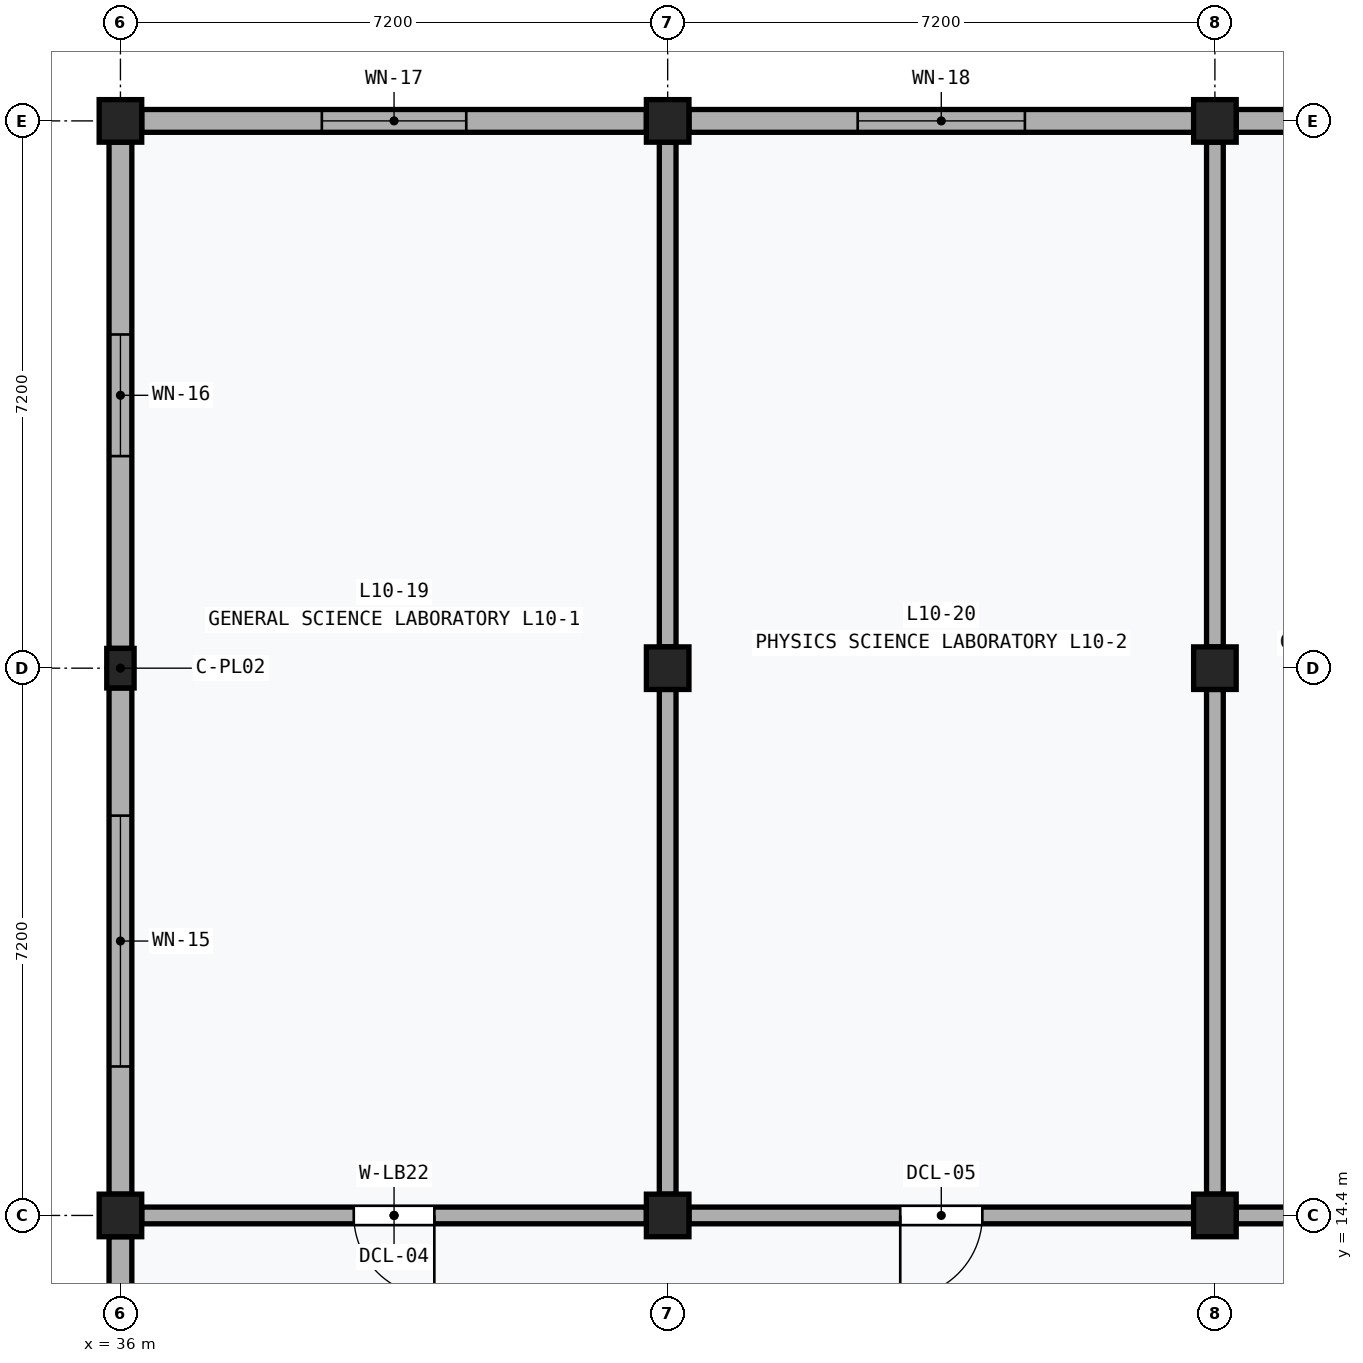
"""IFC4 building model, lengths in metres.
Left out: names, types, materials, properties, quantities, classifications, styles, units other than length and angle.
Written with IfcOpenShell. Run it as: python <this file> out.ifc"""

import sys

from ifc_helpers import new_model, si_unit, direction, frame, frame_2d, origin, origin_2d, place, context, subcontext, project, spatial, rectangle, extrude, element, fill, save


model = new_model("IFC4")
c1 = context("Model", 3, precision=1e-05, world=origin(), true_north=direction((0.0, 1.0)))
c2 = subcontext(c1, "Body", "Model", "MODEL_VIEW")
j1 = project(units=[si_unit("LENGTHUNIT", "METRE"), si_unit("PLANEANGLEUNIT", "RADIAN")], contexts=[c1])
p1 = place(None, origin())
s1 = spatial("IfcSite", under=j1, at=p1, CompositionType="ELEMENT")
p2 = place(p1, origin())
s2 = spatial("IfcBuilding", under=s1, at=p2, CompositionType="ELEMENT")
p3 = place(p2, frame((0.0, 0.0, 42.8)))
s3 = spatial("IfcBuildingStorey", under=s2, at=p3, CompositionType="ELEMENT", Elevation=42.8)
p4 = place(p3, frame((36.0, 14.4, 0.0), z_axis=(0.0, 0.0, 1.0), x_axis=(1.0, 0.0, 0.0)))
e1 = element("IfcColumn", 1, at=p4, inside=s3, PredefinedType="COLUMN", context=c2, shape_type="SweptSolid", body=[
    extrude(rectangle(XDim=0.56, YDim=0.56, at=origin_2d()), origin(), (0.0, 0.0, 1.0), 4.0),
])
p5 = place(p3, frame((36.0, 21.6, 0.0), z_axis=(0.0, 0.0, 1.0), x_axis=(1.0, 0.0, 0.0)))
e2 = element("IfcColumn", 2, at=p5, inside=s3, PredefinedType="PILASTER", context=c2, shape_type="SweptSolid", body=[
    extrude(rectangle(XDim=0.36, YDim=0.52, at=origin_2d()), origin(), (0.0, 0.0, 1.0), 4.0),
])
for number, where, z_axis, x_axis in (
    (3, (36.0, 28.8, 0.0), (0.0, 0.0, 1.0), (1.0, 0.0, 0.0)),
    (4, (43.2, 14.4, 0.0), (0.0, 0.0, 1.0), (1.0, 0.0, 0.0)),
    (5, (43.2, 21.6, 0.0), (0.0, 0.0, 1.0), (1.0, 0.0, 0.0)),
    (6, (43.2, 28.8, 0.0), (0.0, 0.0, 1.0), (1.0, 0.0, 0.0)),
    (7, (50.4, 14.4, 0.0), (0.0, 0.0, 1.0), (1.0, 0.0, 0.0)),
    (8, (50.4, 21.6, 0.0), (0.0, 0.0, 1.0), (1.0, 0.0, 0.0)),
    (9, (50.4, 28.8, 0.0), (0.0, 0.0, 1.0), (1.0, 0.0, 0.0)),
):
    element("IfcColumn", number, at=place(p3, frame(where, z_axis=z_axis, x_axis=x_axis)), inside=s3, PredefinedType="COLUMN", context=c2, shape_type="SweptSolid", body=[
        extrude(rectangle(XDim=0.56, YDim=0.56, at=origin_2d()), origin(), (0.0, 0.0, 1.0), 4.0),
    ])
p6 = place(p3, frame((36.0, 7.48, 0.0), z_axis=(0.0, 0.0, 1.0), x_axis=(0.0, 1.0, 0.0)))
e10 = element("IfcWall", 10, at=p6, inside=s3, PredefinedType="SOLIDWALL", context=c2, shape_type="SweptSolid", body=[
    extrude(rectangle(XDim=6.64, YDim=0.3, at=frame_2d((3.32, 0.0))), origin(), (0.0, 0.0, 1.0), 3.18),
])
p7 = place(p6, frame((1.82, 0.0, 0.85)))
e11 = element("IfcOpeningElement", 11, at=p7, cuts=e10, PredefinedType="OPENING", context=c2, shape_type="SweptSolid", body=[
    extrude(rectangle(XDim=3.0, YDim=2.0, at=frame_2d((1.5, 1.0))), frame((0.0, 0.162, 0.0), z_axis=(0.0, -1.0, 0.0), x_axis=(1.0, 0.0, 0.0)), (0.0, 0.0, 1.0), 0.324),
])
p8 = place(p3, frame((36.0, 14.68, 0.0), z_axis=(0.0, 0.0, 1.0), x_axis=(0.0, 1.0, 0.0)))
e12 = element("IfcWall", 12, at=p8, inside=s3, PredefinedType="SOLIDWALL", context=c2, shape_type="SweptSolid", body=[
    extrude(rectangle(XDim=6.66, YDim=0.3, at=frame_2d((3.33, 0.0))), origin(), (0.0, 0.0, 1.0), 3.18),
])
p9 = place(p8, frame((1.68, 0.0, 0.85)))
e13 = element("IfcOpeningElement", 13, at=p9, cuts=e12, PredefinedType="OPENING", context=c2, shape_type="SweptSolid", body=[
    extrude(rectangle(XDim=3.3, YDim=2.0, at=frame_2d((1.65, 1.0))), frame((0.0, 0.162, 0.0), z_axis=(0.0, -1.0, 0.0), x_axis=(1.0, 0.0, 0.0)), (0.0, 0.0, 1.0), 0.324),
])
p10 = place(p3, frame((36.28, 28.8, 0.0), z_axis=(0.0, 0.0, 1.0), x_axis=(1.0, 0.0, 0.0)))
e14 = element("IfcWall", 14, at=p10, inside=s3, PredefinedType="SOLIDWALL", context=c2, shape_type="SweptSolid", body=[
    extrude(rectangle(XDim=6.64, YDim=0.3, at=frame_2d((3.32, 0.0))), origin(), (0.0, 0.0, 1.0), 3.18),
])
p11 = place(p10, frame((2.37, 0.0, 1.1)))
e15 = element("IfcOpeningElement", 15, at=p11, cuts=e14, PredefinedType="OPENING", context=c2, shape_type="SweptSolid", body=[
    extrude(rectangle(XDim=1.9, YDim=1.5, at=frame_2d((0.95, 0.75))), frame((0.0, 0.162, 0.0), z_axis=(0.0, -1.0, 0.0), x_axis=(1.0, 0.0, 0.0)), (0.0, 0.0, 1.0), 0.324),
])
p12 = place(p3, frame((36.0, 21.86, 0.0), z_axis=(0.0, 0.0, 1.0), x_axis=(0.0, 1.0, 0.0)))
e16 = element("IfcWall", 16, at=p12, inside=s3, PredefinedType="SOLIDWALL", context=c2, shape_type="SweptSolid", body=[
    extrude(rectangle(XDim=6.66, YDim=0.3, at=frame_2d((3.33, 0.0))), origin(), (0.0, 0.0, 1.0), 3.18),
])
p13 = place(p12, frame((2.53, 0.0, 1.1)))
e17 = element("IfcOpeningElement", 17, at=p13, cuts=e16, PredefinedType="OPENING", context=c2, shape_type="SweptSolid", body=[
    extrude(rectangle(XDim=1.6, YDim=1.5, at=frame_2d((0.8, 0.75))), frame((0.0, 0.162, 0.0), z_axis=(0.0, -1.0, 0.0), x_axis=(1.0, 0.0, 0.0)), (0.0, 0.0, 1.0), 0.324),
])
p14 = place(p3, frame((43.48, 28.8, 0.0), z_axis=(0.0, 0.0, 1.0), x_axis=(1.0, 0.0, 0.0)))
e18 = element("IfcWall", 18, at=p14, inside=s3, PredefinedType="SOLIDWALL", context=c2, shape_type="SweptSolid", body=[
    extrude(rectangle(XDim=6.64, YDim=0.3, at=frame_2d((3.32, 0.0))), origin(), (0.0, 0.0, 1.0), 3.18),
])
p15 = place(p14, frame((2.22, 0.0, 1.1)))
e19 = element("IfcOpeningElement", 19, at=p15, cuts=e18, PredefinedType="OPENING", context=c2, shape_type="SweptSolid", body=[
    extrude(rectangle(XDim=2.2, YDim=1.5, at=frame_2d((1.1, 0.75))), frame((0.0, 0.162, 0.0), z_axis=(0.0, -1.0, 0.0), x_axis=(1.0, 0.0, 0.0)), (0.0, 0.0, 1.0), 0.324),
])
p16 = place(p3, frame((50.68, 28.8, 0.0), z_axis=(0.0, 0.0, 1.0), x_axis=(1.0, 0.0, 0.0)))
e20 = element("IfcWall", 20, at=p16, inside=s3, PredefinedType="SOLIDWALL", context=c2, shape_type="SweptSolid", body=[
    extrude(rectangle(XDim=6.74, YDim=0.3, at=frame_2d((3.37, 0.0))), origin(), (0.0, 0.0, 1.0), 3.18),
])
p17 = place(p16, frame((2.12, 0.0, 1.1)))
e21 = element("IfcOpeningElement", 21, at=p17, cuts=e20, PredefinedType="OPENING", context=c2, shape_type="SweptSolid", body=[
    extrude(rectangle(XDim=2.5, YDim=1.5, at=frame_2d((1.25, 0.75))), frame((0.0, 0.162, 0.0), z_axis=(0.0, -1.0, 0.0), x_axis=(1.0, 0.0, 0.0)), (0.0, 0.0, 1.0), 0.324),
])
p18 = place(p3, frame((36.28, 14.4, 0.0), z_axis=(0.0, 0.0, 1.0), x_axis=(1.0, 0.0, 0.0)))
e22 = element("IfcWall", 22, at=p18, inside=s3, PredefinedType="PARTITIONING", context=c2, shape_type="SweptSolid", body=[
    extrude(rectangle(XDim=6.64, YDim=0.22, at=frame_2d((3.32, 0.0))), origin(), (0.0, 0.0, 1.0), 3.02),
])
p19 = place(p18, frame((2.79, 0.0, 0.0)))
e23 = element("IfcOpeningElement", 23, at=p19, cuts=e22, PredefinedType="OPENING", context=c2, shape_type="SweptSolid", body=[
    extrude(rectangle(XDim=1.06, YDim=2.16, at=frame_2d((0.53, 1.08))), frame((0.0, 0.122, 0.0), z_axis=(0.0, -1.0, 0.0), x_axis=(1.0, 0.0, 0.0)), (0.0, 0.0, 1.0), 0.244),
])
for number, where, z_axis, x_axis in (
    (24, (43.2, 14.68, 0.0), (0.0, 0.0, 1.0), (0.0, 1.0, 0.0)),
    (25, (43.2, 21.88, 0.0), (0.0, 0.0, 1.0), (0.0, 1.0, 0.0)),
):
    element("IfcWall", number, at=place(p3, frame(where, z_axis=z_axis, x_axis=x_axis)), inside=s3, PredefinedType="PARTITIONING", context=c2, shape_type="SweptSolid", body=[
        extrude(rectangle(XDim=6.64, YDim=0.22, at=frame_2d((3.32, 0.0))), origin(), (0.0, 0.0, 1.0), 3.02),
    ])
p20 = place(p3, frame((43.48, 14.4, 0.0), z_axis=(0.0, 0.0, 1.0), x_axis=(1.0, 0.0, 0.0)))
e26 = element("IfcWall", 26, at=p20, inside=s3, PredefinedType="PARTITIONING", context=c2, shape_type="SweptSolid", body=[
    extrude(rectangle(XDim=6.64, YDim=0.22, at=frame_2d((3.32, 0.0))), origin(), (0.0, 0.0, 1.0), 3.02),
])
p21 = place(p20, frame((2.78, 0.0, 0.0)))
e27 = element("IfcOpeningElement", 27, at=p21, cuts=e26, PredefinedType="OPENING", context=c2, shape_type="SweptSolid", body=[
    extrude(rectangle(XDim=1.08, YDim=2.18, at=frame_2d((0.54, 1.09))), frame((0.0, 0.122, 0.0), z_axis=(0.0, -1.0, 0.0), x_axis=(1.0, 0.0, 0.0)), (0.0, 0.0, 1.0), 0.244),
])
for number, where, z_axis, x_axis in (
    (28, (50.4, 14.68, 0.0), (0.0, 0.0, 1.0), (0.0, 1.0, 0.0)),
    (29, (50.4, 21.88, 0.0), (0.0, 0.0, 1.0), (0.0, 1.0, 0.0)),
):
    element("IfcWall", number, at=place(p3, frame(where, z_axis=z_axis, x_axis=x_axis)), inside=s3, PredefinedType="PARTITIONING", context=c2, shape_type="SweptSolid", body=[
        extrude(rectangle(XDim=6.64, YDim=0.22, at=frame_2d((3.32, 0.0))), origin(), (0.0, 0.0, 1.0), 3.02),
    ])
p22 = place(p3, frame((50.68, 14.4, 0.0), z_axis=(0.0, 0.0, 1.0), x_axis=(1.0, 0.0, 0.0)))
e30 = element("IfcWall", 30, at=p22, inside=s3, PredefinedType="PARTITIONING", context=c2, shape_type="SweptSolid", body=[
    extrude(rectangle(XDim=6.64, YDim=0.22, at=frame_2d((3.32, 0.0))), origin(), (0.0, 0.0, 1.0), 3.02),
])
p23 = place(p22, frame((2.76, 0.0, 0.0)))
e31 = element("IfcOpeningElement", 31, at=p23, cuts=e30, PredefinedType="OPENING", context=c2, shape_type="SweptSolid", body=[
    extrude(rectangle(XDim=1.12, YDim=2.2, at=frame_2d((0.56, 1.1))), frame((0.0, 0.122, 0.0), z_axis=(0.0, -1.0, 0.0), x_axis=(1.0, 0.0, 0.0)), (0.0, 0.0, 1.0), 0.244),
])
p24 = place(p9, origin())
e32 = element("IfcWindow", 32, at=p24, inside=s3, PartitioningType="SINGLE_PANEL", PredefinedType="WINDOW", context=c2, shape_type="SweptSolid", body=[
    extrude(rectangle(XDim=3.3, YDim=2.0, at=frame_2d((1.65, 1.0))), frame((0.0, 0.03, 0.0), z_axis=(0.0, -1.0, 0.0), x_axis=(1.0, 0.0, 0.0)), (0.0, 0.0, 1.0), 0.06),
])
fill(e13, e32)
p25 = place(p11, origin())
e33 = element("IfcWindow", 33, at=p25, inside=s3, PartitioningType="SINGLE_PANEL", PredefinedType="WINDOW", context=c2, shape_type="SweptSolid", body=[
    extrude(rectangle(XDim=1.9, YDim=1.5, at=frame_2d((0.95, 0.75))), frame((0.0, 0.03, 0.0), z_axis=(0.0, -1.0, 0.0), x_axis=(1.0, 0.0, 0.0)), (0.0, 0.0, 1.0), 0.06),
])
fill(e15, e33)
p26 = place(p13, origin())
e34 = element("IfcWindow", 34, at=p26, inside=s3, PartitioningType="SINGLE_PANEL", PredefinedType="WINDOW", context=c2, shape_type="SweptSolid", body=[
    extrude(rectangle(XDim=1.6, YDim=1.5, at=frame_2d((0.8, 0.75))), frame((0.0, 0.03, 0.0), z_axis=(0.0, -1.0, 0.0), x_axis=(1.0, 0.0, 0.0)), (0.0, 0.0, 1.0), 0.06),
])
fill(e17, e34)
p27 = place(p15, origin())
e35 = element("IfcWindow", 35, at=p27, inside=s3, PartitioningType="SINGLE_PANEL", PredefinedType="WINDOW", context=c2, shape_type="SweptSolid", body=[
    extrude(rectangle(XDim=2.2, YDim=1.5, at=frame_2d((1.1, 0.75))), frame((0.0, 0.03, 0.0), z_axis=(0.0, -1.0, 0.0), x_axis=(1.0, 0.0, 0.0)), (0.0, 0.0, 1.0), 0.06),
])
fill(e19, e35)
p28 = place(p19, frame((1.06, 0.0, 0.0), z_axis=(0.0, 0.0, 1.0), x_axis=(-1.0, 0.0, 0.0)))
e36 = element("IfcDoor", 36, at=p28, inside=s3, OperationType="SINGLE_SWING_LEFT", PredefinedType="DOOR", context=c2, shape_type="SweptSolid", body=[
    extrude(rectangle(XDim=1.06, YDim=2.16, at=frame_2d((0.53, 1.08))), frame((0.0, 0.025, 0.0), z_axis=(0.0, -1.0, 0.0), x_axis=(1.0, 0.0, 0.0)), (0.0, 0.0, 1.0), 0.05),
])
fill(e23, e36)
p29 = place(p21, frame((1.08, 0.0, 0.0), z_axis=(0.0, 0.0, 1.0), x_axis=(-1.0, 0.0, 0.0)))
e37 = element("IfcDoor", 37, at=p29, inside=s3, OperationType="SINGLE_SWING_RIGHT", PredefinedType="DOOR", context=c2, shape_type="SweptSolid", body=[
    extrude(rectangle(XDim=1.08, YDim=2.18, at=frame_2d((0.54, 1.09))), frame((0.0, 0.025, 0.0), z_axis=(0.0, -1.0, 0.0), x_axis=(1.0, 0.0, 0.0)), (0.0, 0.0, 1.0), 0.05),
])
fill(e27, e37)
save(model, sys.argv[1])
